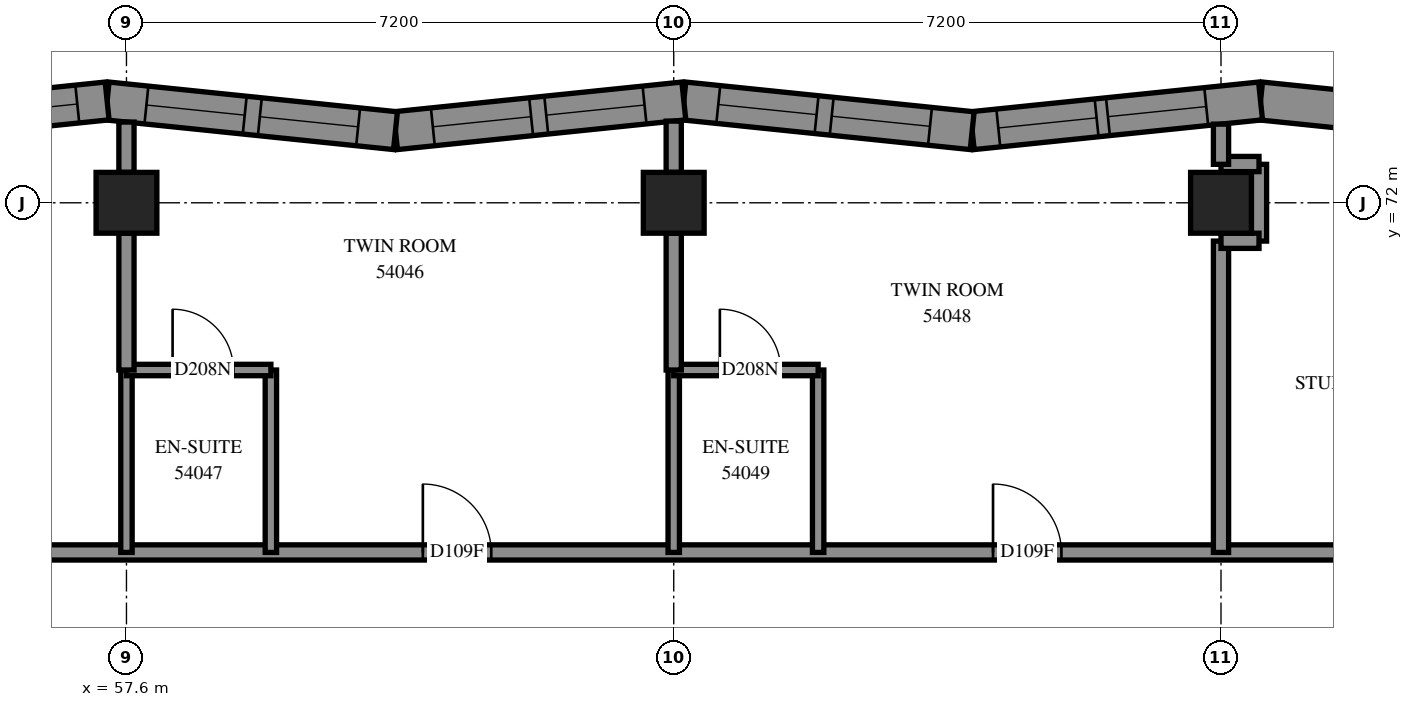
"""IFC4 building model, lengths in metres.
Left out: names, types, materials, properties, quantities, classifications, styles, units other than length and angle.
Written with IfcOpenShell. Run it as: python <this file> out.ifc"""

import sys

from ifc_helpers import new_model, si_unit, direction, frame, frame_2d, origin, origin_2d, place, context, subcontext, project, spatial, polyline, rectangle, outline, extrude, element, fill, save


model = new_model("IFC4")
c1 = context("Model", 3, precision=1e-05, world=origin(), true_north=direction((0.0, 1.0)))
c2 = subcontext(c1, "Body", "Model", "MODEL_VIEW")
j1 = project(units=[si_unit("LENGTHUNIT", "METRE"), si_unit("PLANEANGLEUNIT", "RADIAN")], contexts=[c1])
p1 = place(None, origin())
s1 = spatial("IfcSite", under=j1, at=p1, CompositionType="ELEMENT")
p2 = place(p1, origin())
s2 = spatial("IfcBuilding", under=s1, at=p2, CompositionType="ELEMENT")
p3 = place(p2, frame((0.0, 0.0, 199.8)))
s3 = spatial("IfcBuildingStorey", under=s2, at=p3, CompositionType="ELEMENT", Elevation=199.8)
for number, where, z_axis, x_axis in (
    (1, (57.6, 72.0, 0.0), (0.0, 0.0, 1.0), (1.0, 0.0, 0.0)),
    (2, (64.8, 72.0, 0.0), (0.0, 0.0, 1.0), (1.0, 0.0, 0.0)),
    (3, (72.0, 72.0, 0.0), (0.0, 0.0, 1.0), (1.0, 0.0, 0.0)),
):
    element("IfcColumn", number, at=place(p3, frame(where, z_axis=z_axis, x_axis=x_axis)), inside=s3, PredefinedType="COLUMN", context=c2, shape_type="SweptSolid", body=[
        extrude(rectangle(XDim=0.8, YDim=0.8, at=origin_2d()), origin(), (0.0, 0.0, 1.0), 3.1),
    ])
p4 = place(p3, frame((76.333, 72.947, 0.0), z_axis=(0.0, 0.0, 1.0), x_axis=(-0.994730395, 0.10252532, 0.0)))
e4 = element("IfcWall", 4, at=p4, inside=s3, PredefinedType="SOLIDWALL", context=c2, shape_type="SweptSolid", body=[
    extrude(outline(polyline([(0.045, -0.25), (3.859, -0.25), (3.808, 0.25), (-0.045, 0.25), (0.045, -0.25)])), origin(), (0.0, 0.0, 1.0), 3.1),
])
p5 = place(p4, frame((1.572, 0.0, 0.45)))
e5 = element("IfcOpeningElement", 5, at=p5, cuts=e4, PredefinedType="OPENING", context=c2, shape_type="SweptSolid", body=[
    extrude(rectangle(XDim=1.2, YDim=2.5, at=frame_2d((0.6, 1.25))), frame((0.0, 0.26, 0.0), z_axis=(0.0, -1.0, 0.0), x_axis=(1.0, 0.0, 0.0)), (0.0, 0.0, 1.0), 0.52),
])
p6 = place(p3, frame((72.52, 73.34, 0.0), z_axis=(0.0, 0.0, 1.0), x_axis=(-0.9947306832, -0.1025225234, 0.0)))
e6 = element("IfcWall", 6, at=p6, inside=s3, PredefinedType="SOLIDWALL", context=c2, shape_type="SweptSolid", body=[
    extrude(outline(polyline([(-0.026, -0.25), (3.788, -0.25), (3.84, 0.25), (0.026, 0.25), (-0.026, -0.25)])), origin(), (0.0, 0.0, 1.0), 3.1),
])
p7 = place(p6, frame((0.718, 0.0, 0.45)))
e7 = element("IfcOpeningElement", 7, at=p7, cuts=e6, PredefinedType="OPENING", context=c2, shape_type="SweptSolid", body=[
    extrude(rectangle(XDim=1.3, YDim=2.5, at=frame_2d((0.65, 1.25))), frame((0.0, 0.26, 0.0), z_axis=(0.0, -1.0, 0.0), x_axis=(1.0, 0.0, 0.0)), (0.0, 0.0, 1.0), 0.52),
])
p8 = place(p6, frame((2.168, 0.0, 0.45)))
e8 = element("IfcOpeningElement", 8, at=p8, cuts=e6, PredefinedType="OPENING", context=c2, shape_type="SweptSolid", body=[
    extrude(rectangle(XDim=1.3, YDim=2.5, at=frame_2d((0.65, 1.25))), frame((0.0, 0.26, 0.0), z_axis=(0.0, -1.0, 0.0), x_axis=(1.0, 0.0, 0.0)), (0.0, 0.0, 1.0), 0.52),
])
p9 = place(p3, frame((68.727, 72.949, 0.0), z_axis=(0.0, 0.0, 1.0), x_axis=(-0.9947306832, 0.1025225234, 0.0)))
e9 = element("IfcWall", 9, at=p9, inside=s3, PredefinedType="SOLIDWALL", context=c2, shape_type="SweptSolid", body=[
    extrude(outline(polyline([(0.026, -0.25), (3.84, -0.25), (3.788, 0.25), (-0.026, 0.25), (0.026, -0.25)])), origin(), (0.0, 0.0, 1.0), 3.1),
])
p10 = place(p9, frame((0.558, 0.0, 0.45)))
e10 = element("IfcOpeningElement", 10, at=p10, cuts=e9, PredefinedType="OPENING", context=c2, shape_type="SweptSolid", body=[
    extrude(rectangle(XDim=1.3, YDim=2.5, at=frame_2d((0.65, 1.25))), frame((0.0, 0.26, 0.0), z_axis=(0.0, -1.0, 0.0), x_axis=(1.0, 0.0, 0.0)), (0.0, 0.0, 1.0), 0.52),
])
p11 = place(p9, frame((2.058, 0.0, 0.45)))
e11 = element("IfcOpeningElement", 11, at=p11, cuts=e9, PredefinedType="OPENING", context=c2, shape_type="SweptSolid", body=[
    extrude(rectangle(XDim=1.3, YDim=2.5, at=frame_2d((0.65, 1.25))), frame((0.0, 0.26, 0.0), z_axis=(0.0, -1.0, 0.0), x_axis=(1.0, 0.0, 0.0)), (0.0, 0.0, 1.0), 0.52),
])
p12 = place(p3, frame((64.933, 73.34, 0.0), z_axis=(0.0, 0.0, 1.0), x_axis=(-0.9947304076, -0.1025251975, 0.0)))
e12 = element("IfcWall", 12, at=p12, inside=s3, PredefinedType="SOLIDWALL", context=c2, shape_type="SweptSolid", body=[
    extrude(outline(polyline([(-0.026, -0.25), (3.788, -0.25), (3.84, 0.25), (0.026, 0.25), (-0.026, -0.25)])), origin(), (0.0, 0.0, 1.0), 3.1),
])
p13 = place(p12, frame((0.52, 0.0, 0.45)))
e13 = element("IfcOpeningElement", 13, at=p13, cuts=e12, PredefinedType="OPENING", context=c2, shape_type="SweptSolid", body=[
    extrude(rectangle(XDim=1.3, YDim=2.5, at=frame_2d((0.65, 1.25))), frame((0.0, 0.26, 0.0), z_axis=(0.0, -1.0, 0.0), x_axis=(1.0, 0.0, 0.0)), (0.0, 0.0, 1.0), 0.52),
])
p14 = place(p12, frame((2.02, 0.0, 0.45)))
e14 = element("IfcOpeningElement", 14, at=p14, cuts=e12, PredefinedType="OPENING", context=c2, shape_type="SweptSolid", body=[
    extrude(rectangle(XDim=1.3, YDim=2.5, at=frame_2d((0.65, 1.25))), frame((0.0, 0.26, 0.0), z_axis=(0.0, -1.0, 0.0), x_axis=(1.0, 0.0, 0.0)), (0.0, 0.0, 1.0), 0.52),
])
p15 = place(p3, frame((61.139, 72.949, 0.0), z_axis=(0.0, 0.0, 1.0), x_axis=(-0.9947306832, 0.1025225234, 0.0)))
e15 = element("IfcWall", 15, at=p15, inside=s3, PredefinedType="SOLIDWALL", context=c2, shape_type="SweptSolid", body=[
    extrude(outline(polyline([(0.026, -0.25), (3.84, -0.25), (3.788, 0.25), (-0.026, 0.25), (0.026, -0.25)])), origin(), (0.0, 0.0, 1.0), 3.1),
])
p16 = place(p15, frame((0.494, 0.0, 0.45)))
e16 = element("IfcOpeningElement", 16, at=p16, cuts=e15, PredefinedType="OPENING", context=c2, shape_type="SweptSolid", body=[
    extrude(rectangle(XDim=1.3, YDim=2.5, at=frame_2d((0.65, 1.25))), frame((0.0, 0.26, 0.0), z_axis=(0.0, -1.0, 0.0), x_axis=(1.0, 0.0, 0.0)), (0.0, 0.0, 1.0), 0.52),
])
p17 = place(p15, frame((1.994, 0.0, 0.45)))
e17 = element("IfcOpeningElement", 17, at=p17, cuts=e15, PredefinedType="OPENING", context=c2, shape_type="SweptSolid", body=[
    extrude(rectangle(XDim=1.3, YDim=2.5, at=frame_2d((0.65, 1.25))), frame((0.0, 0.26, 0.0), z_axis=(0.0, -1.0, 0.0), x_axis=(1.0, 0.0, 0.0)), (0.0, 0.0, 1.0), 0.52),
])
p18 = place(p3, frame((57.346, 73.34, 0.0), z_axis=(0.0, 0.0, 1.0), x_axis=(-0.9947304076, -0.1025251975, 0.0)))
e18 = element("IfcWall", 18, at=p18, inside=s3, PredefinedType="SOLIDWALL", context=c2, shape_type="SweptSolid", body=[
    extrude(outline(polyline([(-0.026, -0.25), (3.788, -0.25), (3.84, 0.25), (0.026, 0.25), (-0.026, -0.25)])), origin(), (0.0, 0.0, 1.0), 3.1),
])
p19 = place(p18, frame((0.395, 0.0, 0.45)))
e19 = element("IfcOpeningElement", 19, at=p19, cuts=e18, PredefinedType="OPENING", context=c2, shape_type="SweptSolid", body=[
    extrude(rectangle(XDim=1.3, YDim=2.5, at=frame_2d((0.65, 1.25))), frame((0.0, 0.26, 0.0), z_axis=(0.0, -1.0, 0.0), x_axis=(1.0, 0.0, 0.0)), (0.0, 0.0, 1.0), 0.52),
])
p20 = place(p18, frame((1.895, 0.0, 0.45)))
e20 = element("IfcOpeningElement", 20, at=p20, cuts=e18, PredefinedType="OPENING", context=c2, shape_type="SweptSolid", body=[
    extrude(rectangle(XDim=1.3, YDim=2.5, at=frame_2d((0.65, 1.25))), frame((0.0, 0.26, 0.0), z_axis=(0.0, -1.0, 0.0), x_axis=(1.0, 0.0, 0.0)), (0.0, 0.0, 1.0), 0.52),
])
p21 = place(p3, frame((55.0, 67.4, 0.0), z_axis=(0.0, 0.0, 1.0), x_axis=(1.0, 0.0, 0.0)))
e21 = element("IfcWall", 21, at=p21, inside=s3, PredefinedType="PARTITIONING", context=c2, shape_type="SweptSolid", body=[
    extrude(rectangle(XDim=19.6, YDim=0.2, at=frame_2d((9.8, 0.0))), origin(), (0.0, 0.0, 1.0), 3.1),
])
p22 = place(p21, frame((6.499, 0.0, 0.0)))
e22 = element("IfcOpeningElement", 22, at=p22, cuts=e21, PredefinedType="OPENING", context=c2, shape_type="SweptSolid", body=[
    extrude(rectangle(XDim=0.9, YDim=2.1, at=frame_2d((0.45, 1.05))), frame((0.0, 0.11, 0.0), z_axis=(0.0, -1.0, 0.0), x_axis=(1.0, 0.0, 0.0)), (0.0, 0.0, 1.0), 0.22),
])
p23 = place(p21, frame((14.001, 0.0, 0.0)))
e23 = element("IfcOpeningElement", 23, at=p23, cuts=e21, PredefinedType="OPENING", context=c2, shape_type="SweptSolid", body=[
    extrude(rectangle(XDim=0.9, YDim=2.1, at=frame_2d((0.45, 1.05))), frame((0.0, 0.11, 0.0), z_axis=(0.0, -1.0, 0.0), x_axis=(1.0, 0.0, 0.0)), (0.0, 0.0, 1.0), 0.22),
])
p24 = place(p3, frame((72.0, 67.4, 0.0), z_axis=(0.0, 0.0, 1.0), x_axis=(0.0, 1.0, 0.0)))
e24 = element("IfcWall", 24, at=p24, inside=s3, PredefinedType="PARTITIONING", context=c2, shape_type="SweptSolid", body=[
    extrude(rectangle(XDim=4.096, YDim=0.2, at=frame_2d((2.048, 0.0))), origin(), (0.0, 0.0, 1.0), 3.1),
])
for number, where, z_axis, x_axis in (
    (25, (59.5, 67.4, 0.0), (0.0, 0.0, 1.0), (0.0, 1.0, 0.0)),
    (26, (57.6, 67.4, 0.0), (0.0, 0.0, 1.0), (0.0, 1.0, 0.0)),
    (27, (66.7, 67.4, 0.0), (0.0, 0.0, 1.0), (0.0, 1.0, 0.0)),
    (28, (64.8, 67.4, 0.0), (0.0, 0.0, 1.0), (0.0, 1.0, 0.0)),
):
    element("IfcWall", number, at=place(p3, frame(where, z_axis=z_axis, x_axis=x_axis)), inside=s3, PredefinedType="PARTITIONING", context=c2, shape_type="SweptSolid", body=[
        extrude(rectangle(XDim=2.4, YDim=0.15, at=frame_2d((1.2, 0.0))), origin(), (0.0, 0.0, 1.0), 3.1),
    ])
p25 = place(p3, frame((64.8, 69.8, 0.0), z_axis=(0.0, 0.0, 1.0), x_axis=(1.0, 0.0, 0.0)))
e29 = element("IfcWall", 29, at=p25, inside=s3, PredefinedType="PARTITIONING", context=c2, shape_type="SweptSolid", body=[
    extrude(rectangle(XDim=1.9, YDim=0.15, at=frame_2d((0.95, 0.0))), origin(), (0.0, 0.0, 1.0), 3.1),
])
p26 = place(p25, frame((0.607, 0.0, 0.0)))
e30 = element("IfcOpeningElement", 30, at=p26, cuts=e29, PredefinedType="OPENING", context=c2, shape_type="SweptSolid", body=[
    extrude(rectangle(XDim=0.8, YDim=2.1, at=frame_2d((0.4, 1.05))), frame((0.0, 0.085, 0.0), z_axis=(0.0, -1.0, 0.0), x_axis=(1.0, 0.0, 0.0)), (0.0, 0.0, 1.0), 0.17),
])
p27 = place(p3, frame((57.6, 69.8, 0.0), z_axis=(0.0, 0.0, 1.0), x_axis=(1.0, 0.0, 0.0)))
e31 = element("IfcWall", 31, at=p27, inside=s3, PredefinedType="PARTITIONING", context=c2, shape_type="SweptSolid", body=[
    extrude(rectangle(XDim=1.9, YDim=0.15, at=frame_2d((0.95, 0.0))), origin(), (0.0, 0.0, 1.0), 3.1),
])
p28 = place(p27, frame((0.607, 0.0, 0.0)))
e32 = element("IfcOpeningElement", 32, at=p28, cuts=e31, PredefinedType="OPENING", context=c2, shape_type="SweptSolid", body=[
    extrude(rectangle(XDim=0.8, YDim=2.1, at=frame_2d((0.4, 1.05))), frame((0.0, 0.085, 0.0), z_axis=(0.0, -1.0, 0.0), x_axis=(1.0, 0.0, 0.0)), (0.0, 0.0, 1.0), 0.17),
])
for number, where, z_axis, x_axis in (
    (33, (57.6, 69.8, 0.0), (0.0, 0.0, 1.0), (0.0, 1.0, 0.0)),
    (34, (64.8, 69.8, 0.0), (0.0, 0.0, 1.0), (0.0, 1.0, 0.0)),
):
    element("IfcWall", number, at=place(p3, frame(where, z_axis=z_axis, x_axis=x_axis)), inside=s3, PredefinedType="PARTITIONING", context=c2, shape_type="SweptSolid", body=[
        extrude(rectangle(XDim=1.8, YDim=0.2, at=frame_2d((0.9, 0.0))), origin(), (0.0, 0.0, 1.0), 3.1),
    ])
p29 = place(p3, frame((72.5, 71.496, 0.0), z_axis=(0.0, 0.0, 1.0), x_axis=(0.0, 1.0, 0.0)))
e35 = element("IfcWall", 35, at=p29, inside=s3, PredefinedType="PARTITIONING", context=c2, shape_type="SweptSolid", body=[
    extrude(rectangle(XDim=1.01, YDim=0.2, at=frame_2d((0.505, 0.0))), origin(), (0.0, 0.0, 1.0), 3.1),
])
p30 = place(p3, frame((64.8, 72.4, 0.0), z_axis=(0.0, 0.0, 1.0), x_axis=(0.0, 1.0, 0.0)))
e36 = element("IfcWall", 36, at=p30, inside=s3, PredefinedType="PARTITIONING", context=c2, shape_type="SweptSolid", body=[
    extrude(rectangle(XDim=0.675, YDim=0.2, at=frame_2d((0.337, 0.0))), origin(), (0.0, 0.0, 1.0), 3.1),
])
p31 = place(p3, frame((57.6, 72.4, 0.0), z_axis=(0.0, 0.0, 1.0), x_axis=(0.0, 1.0, 0.0)))
e37 = element("IfcWall", 37, at=p31, inside=s3, PredefinedType="PARTITIONING", context=c2, shape_type="SweptSolid", body=[
    extrude(rectangle(XDim=0.662, YDim=0.2, at=frame_2d((0.331, 0.0))), origin(), (0.0, 0.0, 1.0), 3.1),
])
for number, where, z_axis, x_axis in (
    (38, (72.0, 71.5, 0.0), (0.0, 0.0, 1.0), (1.0, 0.0, 0.0)),
    (39, (72.0, 72.51, 0.0), (0.0, 0.0, 1.0), (1.0, 0.0, 0.0)),
):
    element("IfcWall", number, at=place(p3, frame(where, z_axis=z_axis, x_axis=x_axis)), inside=s3, PredefinedType="PARTITIONING", context=c2, shape_type="SweptSolid", body=[
        extrude(rectangle(XDim=0.5, YDim=0.2, at=frame_2d((0.25, 0.0))), origin(), (0.0, 0.0, 1.0), 3.1),
    ])
p32 = place(p3, frame((72.0, 72.506, 0.0), z_axis=(0.0, 0.0, 1.0), x_axis=(0.0, 1.0, 0.0)))
e40 = element("IfcWall", 40, at=p32, inside=s3, PredefinedType="PARTITIONING", context=c2, shape_type="SweptSolid", body=[
    extrude(rectangle(XDim=0.529, YDim=0.2, at=frame_2d((0.264, 0.0))), origin(), (0.0, 0.0, 1.0), 3.1),
])
p33 = place(p7, origin())
e41 = element("IfcWindow", 41, at=p33, inside=s3, PartitioningType="SINGLE_PANEL", PredefinedType="WINDOW", context=c2, shape_type="SweptSolid", body=[
    extrude(rectangle(XDim=1.3, YDim=2.5, at=frame_2d((0.65, 1.25))), frame((0.0, 0.18, 0.0), z_axis=(0.0, -1.0, 0.0), x_axis=(1.0, 0.0, 0.0)), (0.0, 0.0, 1.0), 0.06),
])
fill(e7, e41)
p34 = place(p8, origin())
e42 = element("IfcWindow", 42, at=p34, inside=s3, PartitioningType="SINGLE_PANEL", PredefinedType="WINDOW", context=c2, shape_type="SweptSolid", body=[
    extrude(rectangle(XDim=1.3, YDim=2.5, at=frame_2d((0.65, 1.25))), frame((0.0, 0.18, 0.0), z_axis=(0.0, -1.0, 0.0), x_axis=(1.0, 0.0, 0.0)), (0.0, 0.0, 1.0), 0.06),
])
fill(e8, e42)
p35 = place(p10, origin())
e43 = element("IfcWindow", 43, at=p35, inside=s3, PartitioningType="SINGLE_PANEL", PredefinedType="WINDOW", context=c2, shape_type="SweptSolid", body=[
    extrude(rectangle(XDim=1.3, YDim=2.5, at=frame_2d((0.65, 1.25))), frame((0.0, 0.18, 0.0), z_axis=(0.0, -1.0, 0.0), x_axis=(1.0, 0.0, 0.0)), (0.0, 0.0, 1.0), 0.06),
])
fill(e10, e43)
p36 = place(p11, origin())
e44 = element("IfcWindow", 44, at=p36, inside=s3, PartitioningType="SINGLE_PANEL", PredefinedType="WINDOW", context=c2, shape_type="SweptSolid", body=[
    extrude(rectangle(XDim=1.3, YDim=2.5, at=frame_2d((0.65, 1.25))), frame((0.0, 0.18, 0.0), z_axis=(0.0, -1.0, 0.0), x_axis=(1.0, 0.0, 0.0)), (0.0, 0.0, 1.0), 0.06),
])
fill(e11, e44)
p37 = place(p13, origin())
e45 = element("IfcWindow", 45, at=p37, inside=s3, PartitioningType="SINGLE_PANEL", PredefinedType="WINDOW", context=c2, shape_type="SweptSolid", body=[
    extrude(rectangle(XDim=1.3, YDim=2.5, at=frame_2d((0.65, 1.25))), frame((0.0, 0.18, 0.0), z_axis=(0.0, -1.0, 0.0), x_axis=(1.0, 0.0, 0.0)), (0.0, 0.0, 1.0), 0.06),
])
fill(e13, e45)
p38 = place(p14, origin())
e46 = element("IfcWindow", 46, at=p38, inside=s3, PartitioningType="SINGLE_PANEL", PredefinedType="WINDOW", context=c2, shape_type="SweptSolid", body=[
    extrude(rectangle(XDim=1.3, YDim=2.5, at=frame_2d((0.65, 1.25))), frame((0.0, 0.18, 0.0), z_axis=(0.0, -1.0, 0.0), x_axis=(1.0, 0.0, 0.0)), (0.0, 0.0, 1.0), 0.06),
])
fill(e14, e46)
p39 = place(p16, origin())
e47 = element("IfcWindow", 47, at=p39, inside=s3, PartitioningType="SINGLE_PANEL", PredefinedType="WINDOW", context=c2, shape_type="SweptSolid", body=[
    extrude(rectangle(XDim=1.3, YDim=2.5, at=frame_2d((0.65, 1.25))), frame((0.0, 0.18, 0.0), z_axis=(0.0, -1.0, 0.0), x_axis=(1.0, 0.0, 0.0)), (0.0, 0.0, 1.0), 0.06),
])
fill(e16, e47)
p40 = place(p17, origin())
e48 = element("IfcWindow", 48, at=p40, inside=s3, PartitioningType="SINGLE_PANEL", PredefinedType="WINDOW", context=c2, shape_type="SweptSolid", body=[
    extrude(rectangle(XDim=1.3, YDim=2.5, at=frame_2d((0.65, 1.25))), frame((0.0, 0.18, 0.0), z_axis=(0.0, -1.0, 0.0), x_axis=(1.0, 0.0, 0.0)), (0.0, 0.0, 1.0), 0.06),
])
fill(e17, e48)
p41 = place(p19, origin())
e49 = element("IfcWindow", 49, at=p41, inside=s3, PartitioningType="SINGLE_PANEL", PredefinedType="WINDOW", context=c2, shape_type="SweptSolid", body=[
    extrude(rectangle(XDim=1.3, YDim=2.5, at=frame_2d((0.65, 1.25))), frame((0.0, 0.18, 0.0), z_axis=(0.0, -1.0, 0.0), x_axis=(1.0, 0.0, 0.0)), (0.0, 0.0, 1.0), 0.06),
])
fill(e19, e49)
p42 = place(p22, origin())
e50 = element("IfcDoor", 50, at=p42, inside=s3, OperationType="SINGLE_SWING_RIGHT", PredefinedType="DOOR", context=c2, shape_type="SweptSolid", body=[
    extrude(rectangle(XDim=0.9, YDim=2.1, at=frame_2d((0.45, 1.05))), frame((0.0, 0.025, 0.0), z_axis=(0.0, -1.0, 0.0), x_axis=(1.0, 0.0, 0.0)), (0.0, 0.0, 1.0), 0.05),
])
fill(e22, e50)
p43 = place(p28, origin())
e51 = element("IfcDoor", 51, at=p43, inside=s3, OperationType="SINGLE_SWING_RIGHT", PredefinedType="DOOR", context=c2, shape_type="SweptSolid", body=[
    extrude(rectangle(XDim=0.8, YDim=2.1, at=frame_2d((0.4, 1.05))), frame((0.0, 0.025, 0.0), z_axis=(0.0, -1.0, 0.0), x_axis=(1.0, 0.0, 0.0)), (0.0, 0.0, 1.0), 0.05),
])
fill(e32, e51)
p44 = place(p23, origin())
e52 = element("IfcDoor", 52, at=p44, inside=s3, OperationType="SINGLE_SWING_RIGHT", PredefinedType="DOOR", context=c2, shape_type="SweptSolid", body=[
    extrude(rectangle(XDim=0.9, YDim=2.1, at=frame_2d((0.45, 1.05))), frame((0.0, 0.025, 0.0), z_axis=(0.0, -1.0, 0.0), x_axis=(1.0, 0.0, 0.0)), (0.0, 0.0, 1.0), 0.05),
])
fill(e23, e52)
p45 = place(p26, origin())
e53 = element("IfcDoor", 53, at=p45, inside=s3, OperationType="SINGLE_SWING_RIGHT", PredefinedType="DOOR", context=c2, shape_type="SweptSolid", body=[
    extrude(rectangle(XDim=0.8, YDim=2.1, at=frame_2d((0.4, 1.05))), frame((0.0, 0.025, 0.0), z_axis=(0.0, -1.0, 0.0), x_axis=(1.0, 0.0, 0.0)), (0.0, 0.0, 1.0), 0.05),
])
fill(e30, e53)
save(model, sys.argv[1])
